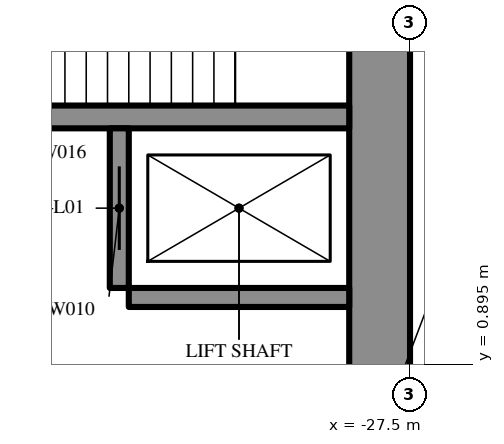
"""IFC4 building model, lengths in metres.
Left out: names, types, materials, properties, quantities, classifications, styles, units other than length and angle.
Written with IfcOpenShell. Run it as: python <this file> out.ifc"""

import sys

from ifc_helpers import new_model, si_unit, direction, frame, frame_2d, origin, place, context, subcontext, project, spatial, rectangle, extrude, element, fill, save


model = new_model("IFC4")
c1 = context("Model", 3, precision=1e-05, world=origin(), true_north=direction((0.0, 1.0)))
c2 = subcontext(c1, "Body", "Model", "MODEL_VIEW")
j1 = project(units=[si_unit("LENGTHUNIT", "METRE"), si_unit("PLANEANGLEUNIT", "RADIAN")], contexts=[c1])
p1 = place(None, origin())
s1 = spatial("IfcSite", under=j1, at=p1, CompositionType="ELEMENT")
p2 = place(p1, origin())
s2 = spatial("IfcBuilding", under=s1, at=p2, CompositionType="ELEMENT")
p3 = place(p2, frame((0.0, 0.0, 7.2)))
s3 = spatial("IfcBuildingStorey", under=s2, at=p3, CompositionType="ELEMENT", Elevation=7.2)
p4 = place(p3, frame((-27.9, 8.6, 0.0), z_axis=(0.0, 0.0, 1.0), x_axis=(0.0, -1.0, 0.0)))
e1 = element("IfcWall", 1, at=p4, inside=s3, PredefinedType="SHEAR", context=c2, shape_type="SweptSolid", body=[
    extrude(rectangle(XDim=17.2, YDim=0.8, at=frame_2d((8.6, 0.0))), origin(), (0.0, 0.0, 1.0), 5.4),
])
p5 = place(p3, frame((-28.3, 4.15, 0.0), z_axis=(0.0, 0.0, 1.0), x_axis=(-1.0, 0.0, 0.0)))
e2 = element("IfcWall", 2, at=p5, inside=s3, PredefinedType="SHEAR", context=c2, shape_type="SweptSolid", body=[
    extrude(rectangle(XDim=8.4, YDim=0.3, at=frame_2d((4.2, 0.0))), origin(), (0.0, 0.0, 1.0), 5.4),
])
p6 = place(p3, frame((-31.325, 4.0, 0.0), z_axis=(0.0, 0.0, 1.0), x_axis=(0.0, -1.0, 0.0)))
e3 = element("IfcWall", 3, at=p6, inside=s3, PredefinedType="SHEAR", context=c2, shape_type="SweptSolid", body=[
    extrude(rectangle(XDim=2.1, YDim=0.25, at=frame_2d((1.05, 0.0))), origin(), (0.0, 0.0, 1.0), 5.4),
])
p7 = place(p6, frame((0.5, 0.0, 0.0)))
e4 = element("IfcOpeningElement", 4, at=p7, cuts=e3, PredefinedType="OPENING", context=c2, shape_type="SweptSolid", body=[
    extrude(rectangle(XDim=1.1, YDim=2.2, at=frame_2d((0.55, 1.1))), frame((0.0, 0.135, 0.0), z_axis=(0.0, -1.0, 0.0), x_axis=(1.0, 0.0, 0.0)), (0.0, 0.0, 1.0), 0.27),
])
p8 = place(p3, frame((-28.3, 1.775, 0.0), z_axis=(0.0, 0.0, 1.0), x_axis=(-1.0, 0.0, 0.0)))
e5 = element("IfcWall", 5, at=p8, inside=s3, PredefinedType="SHEAR", context=c2, shape_type="SweptSolid", body=[
    extrude(rectangle(XDim=2.9, YDim=0.25, at=frame_2d((1.45, 0.0))), origin(), (0.0, 0.0, 1.0), 5.4),
])
p9 = place(p3, frame((-27.2, 14.3, 0.0), z_axis=(0.0, 0.0, 1.0), x_axis=(-0.866026593062, -0.499997940104, 0.0)))
e6 = element("IfcWall", 6, at=p9, inside=s3, PredefinedType="SHEAR", context=c2, shape_type="SweptSolid", body=[
    extrude(rectangle(XDim=28.946, YDim=2.0, at=frame_2d((14.473, 0.0))), origin(), (0.0, 0.0, 1.0), 5.4),
])
p10 = place(p9, frame((4.6, 0.0, 0.0)))
e7 = element("IfcOpeningElement", 7, at=p10, cuts=e6, PredefinedType="OPENING", context=c2, shape_type="SweptSolid", body=[
    extrude(rectangle(XDim=1.0, YDim=2.2, at=frame_2d((0.5, 1.1))), frame((0.0, 1.01, 0.0), z_axis=(0.0, -1.0, 0.0), x_axis=(1.0, 0.0, 0.0)), (0.0, 0.0, 1.0), 2.02),
])
p11 = place(p9, frame((13.395, 0.0, 0.0)))
e8 = element("IfcOpeningElement", 8, at=p11, cuts=e6, PredefinedType="OPENING", context=c2, shape_type="SweptSolid", body=[
    extrude(rectangle(XDim=1.8, YDim=2.2, at=frame_2d((0.9, 1.1))), frame((0.0, 1.01, 0.0), z_axis=(0.0, -1.0, 0.0), x_axis=(1.0, 0.0, 0.0)), (0.0, 0.0, 1.0), 2.02),
])
p12 = place(p7, origin())
e9 = element("IfcDoor", 9, at=p12, inside=s3, OperationType="SLIDING_TO_LEFT", PredefinedType="USERDEFINED", context=c2, shape_type="SweptSolid", body=[
    extrude(rectangle(XDim=1.1, YDim=2.2, at=frame_2d((0.55, 1.1))), frame((0.0, 0.025, 0.0), z_axis=(0.0, -1.0, 0.0), x_axis=(1.0, 0.0, 0.0)), (0.0, 0.0, 1.0), 0.05),
])
fill(e4, e9)
save(model, sys.argv[1])
